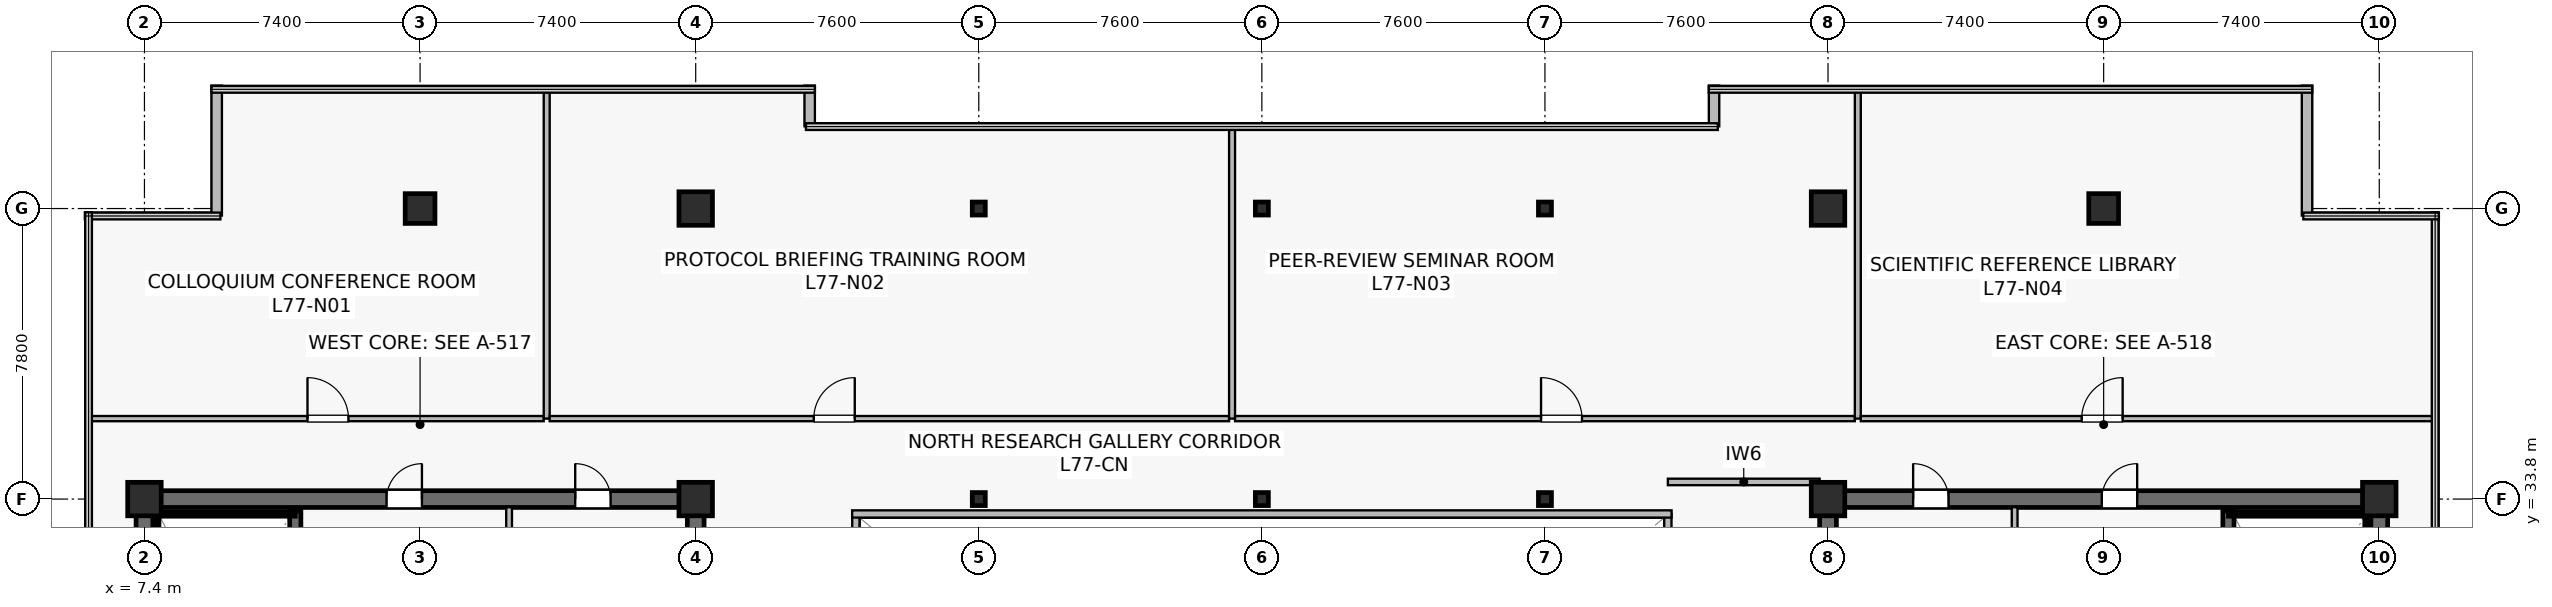
"""IFC4 building model, lengths in metres.
Left out: names, types, materials, properties, quantities, classifications, styles, units other than length and angle.
Written with IfcOpenShell. Run it as: python <this file> out.ifc"""

import sys

from ifc_helpers import new_model, si_unit, direction, frame, frame_2d, origin, origin_2d, place, context, subcontext, project, spatial, rectangle, i_section, extrude, source, transform, mapped, element, fill, save


model = new_model("IFC4")
c1 = context("Model", 3, precision=1e-05, world=origin(), true_north=direction((0.0, 1.0)))
c2 = subcontext(c1, "Body", "Model", "MODEL_VIEW")
j1 = project(units=[si_unit("LENGTHUNIT", "METRE"), si_unit("PLANEANGLEUNIT", "RADIAN")], contexts=[c1])
p1 = place(None, origin())
s1 = spatial("IfcSite", under=j1, at=p1, CompositionType="ELEMENT")
p2 = place(p1, origin())
s2 = spatial("IfcBuilding", under=s1, at=p2, CompositionType="ELEMENT")
p3 = place(p2, frame((0.0, 0.0, 322.8)))
s3 = spatial("IfcBuildingStorey", under=s2, at=p3, CompositionType="ELEMENT", Elevation=322.8)
p4 = place(p3, frame((7.175, 33.8, 0.0), z_axis=(0.0, 0.0, 1.0), x_axis=(1.0, 0.0, 0.0)))
e1 = element("IfcWall", 1, at=p4, inside=s3, PredefinedType="SHEAR", context=c2, shape_type="SweptSolid", body=[
    extrude(rectangle(XDim=15.25, YDim=0.45, at=frame_2d((7.625, 0.0))), origin(), (0.0, 0.0, 1.0), 3.92),
])
p5 = place(p4, frame((6.725, 0.0, 0.0)))
e2 = element("IfcOpeningElement", 2, at=p5, cuts=e1, PredefinedType="OPENING", context=c2, shape_type="SweptSolid", body=[
    extrude(rectangle(XDim=0.95, YDim=2.15, at=frame_2d((0.475, 1.075))), frame((0.0, 0.235, 0.0), z_axis=(0.0, -1.0, 0.0), x_axis=(1.0, 0.0, 0.0)), (0.0, 0.0, 1.0), 0.47),
])
p6 = place(p4, frame((11.79, 0.0, 0.0)))
e3 = element("IfcOpeningElement", 3, at=p6, cuts=e1, PredefinedType="OPENING", context=c2, shape_type="SweptSolid", body=[
    extrude(rectangle(XDim=0.95, YDim=2.15, at=frame_2d((0.475, 1.075))), frame((0.0, 0.235, 0.0), z_axis=(0.0, -1.0, 0.0), x_axis=(1.0, 0.0, 0.0)), (0.0, 0.0, 1.0), 0.47),
])
p7 = place(p3, frame((7.4, 15.025, 0.0), z_axis=(0.0, 0.0, 1.0), x_axis=(0.0, 1.0, 0.0)))
e4 = element("IfcWall", 4, at=p7, inside=s3, PredefinedType="SHEAR", context=c2, shape_type="SweptSolid", body=[
    extrude(rectangle(XDim=18.55, YDim=0.45, at=frame_2d((9.275, 0.0))), origin(), (0.0, 0.0, 1.0), 3.92),
])
p8 = place(p3, frame((22.2, 15.025, 0.0), z_axis=(0.0, 0.0, 1.0), x_axis=(0.0, 1.0, 0.0)))
e5 = element("IfcWall", 5, at=p8, inside=s3, PredefinedType="SHEAR", context=c2, shape_type="SweptSolid", body=[
    extrude(rectangle(XDim=18.55, YDim=0.45, at=frame_2d((9.275, 0.0))), origin(), (0.0, 0.0, 1.0), 3.92),
])
p9 = place(p8, frame((3.525, 0.0, 0.0)))
e6 = element("IfcOpeningElement", 6, at=p9, cuts=e5, PredefinedType="OPENING", context=c2, shape_type="SweptSolid", body=[
    extrude(rectangle(XDim=1.42, YDim=2.2, at=frame_2d((0.71, 1.1))), frame((0.0, 0.235, 0.0), z_axis=(0.0, -1.0, 0.0), x_axis=(1.0, 0.0, 0.0)), (0.0, 0.0, 1.0), 0.47),
])
p10 = place(p3, frame((11.45, 24.85, 0.0), z_axis=(0.0, 0.0, 1.0), x_axis=(0.0, 1.0, 0.0)))
e7 = element("IfcWall", 7, at=p10, inside=s3, PredefinedType="SHEAR", context=c2, shape_type="SweptSolid", body=[
    extrude(rectangle(XDim=8.63, YDim=0.3, at=frame_2d((4.315, 0.0))), origin(), (0.0, 0.0, 1.0), 3.92),
])
p11 = place(p10, frame((0.42, 0.0, 0.0)))
e8 = element("IfcOpeningElement", 8, at=p11, cuts=e7, PredefinedType="OPENING", context=c2, shape_type="SweptSolid", body=[
    extrude(rectangle(XDim=1.1, YDim=2.15, at=frame_2d((0.55, 1.075))), frame((0.0, 0.16, 0.0), z_axis=(0.0, -1.0, 0.0), x_axis=(1.0, 0.0, 0.0)), (0.0, 0.0, 1.0), 0.32),
])
p12 = place(p3, frame((7.73, 33.4, 0.0), z_axis=(0.0, 0.0, 1.0), x_axis=(1.0, 0.0, 0.0)))
e9 = element("IfcWall", 9, at=p12, inside=s3, PredefinedType="SOLIDWALL", context=c2, shape_type="SweptSolid", body=[
    extrude(rectangle(XDim=3.72, YDim=0.12, at=frame_2d((1.86, 0.0))), origin(), (0.0, 0.0, 1.0), 3.92),
])
p13 = place(p3, frame((7.73, 25.0, 0.0), z_axis=(0.0, 0.0, 1.0), x_axis=(0.0, 1.0, 0.0)))
e10 = element("IfcWall", 10, at=p13, inside=s3, PredefinedType="SOLIDWALL", context=c2, shape_type="SweptSolid", body=[
    extrude(rectangle(XDim=8.32, YDim=0.12, at=frame_2d((4.16, 0.0))), origin(), (0.0, 0.0, 1.0), 3.92),
])
p14 = place(p3, frame((52.375, 33.8, 0.0), z_axis=(0.0, 0.0, 1.0), x_axis=(1.0, 0.0, 0.0)))
e11 = element("IfcWall", 11, at=p14, inside=s3, PredefinedType="SHEAR", context=c2, shape_type="SweptSolid", body=[
    extrude(rectangle(XDim=15.25, YDim=0.45, at=frame_2d((7.625, 0.0))), origin(), (0.0, 0.0, 1.0), 3.92),
])
p15 = place(p14, frame((7.575, 0.0, 0.0)))
e12 = element("IfcOpeningElement", 12, at=p15, cuts=e11, PredefinedType="OPENING", context=c2, shape_type="SweptSolid", body=[
    extrude(rectangle(XDim=0.95, YDim=2.15, at=frame_2d((0.475, 1.075))), frame((0.0, 0.235, 0.0), z_axis=(0.0, -1.0, 0.0), x_axis=(1.0, 0.0, 0.0)), (0.0, 0.0, 1.0), 0.47),
])
p16 = place(p14, frame((2.51, 0.0, 0.0)))
e13 = element("IfcOpeningElement", 13, at=p16, cuts=e11, PredefinedType="OPENING", context=c2, shape_type="SweptSolid", body=[
    extrude(rectangle(XDim=0.95, YDim=2.15, at=frame_2d((0.475, 1.075))), frame((0.0, 0.235, 0.0), z_axis=(0.0, -1.0, 0.0), x_axis=(1.0, 0.0, 0.0)), (0.0, 0.0, 1.0), 0.47),
])
p17 = place(p3, frame((52.6, 15.025, 0.0), z_axis=(0.0, 0.0, 1.0), x_axis=(0.0, 1.0, 0.0)))
e14 = element("IfcWall", 14, at=p17, inside=s3, PredefinedType="SHEAR", context=c2, shape_type="SweptSolid", body=[
    extrude(rectangle(XDim=18.55, YDim=0.45, at=frame_2d((9.275, 0.0))), origin(), (0.0, 0.0, 1.0), 3.92),
])
p18 = place(p17, frame((3.525, 0.0, 0.0)))
e15 = element("IfcOpeningElement", 15, at=p18, cuts=e14, PredefinedType="OPENING", context=c2, shape_type="SweptSolid", body=[
    extrude(rectangle(XDim=1.42, YDim=2.2, at=frame_2d((0.71, 1.1))), frame((0.0, 0.235, 0.0), z_axis=(0.0, -1.0, 0.0), x_axis=(1.0, 0.0, 0.0)), (0.0, 0.0, 1.0), 0.47),
])
p19 = place(p3, frame((67.4, 15.025, 0.0), z_axis=(0.0, 0.0, 1.0), x_axis=(0.0, 1.0, 0.0)))
e16 = element("IfcWall", 16, at=p19, inside=s3, PredefinedType="SHEAR", context=c2, shape_type="SweptSolid", body=[
    extrude(rectangle(XDim=18.55, YDim=0.45, at=frame_2d((9.275, 0.0))), origin(), (0.0, 0.0, 1.0), 3.92),
])
p20 = place(p3, frame((63.35, 24.85, 0.0), z_axis=(0.0, 0.0, 1.0), x_axis=(0.0, 1.0, 0.0)))
e17 = element("IfcWall", 17, at=p20, inside=s3, PredefinedType="SHEAR", context=c2, shape_type="SweptSolid", body=[
    extrude(rectangle(XDim=8.63, YDim=0.3, at=frame_2d((4.315, 0.0))), origin(), (0.0, 0.0, 1.0), 3.92),
])
p21 = place(p20, frame((0.42, 0.0, 0.0)))
e18 = element("IfcOpeningElement", 18, at=p21, cuts=e17, PredefinedType="OPENING", context=c2, shape_type="SweptSolid", body=[
    extrude(rectangle(XDim=1.1, YDim=2.15, at=frame_2d((0.55, 1.075))), frame((0.0, 0.16, 0.0), z_axis=(0.0, -1.0, 0.0), x_axis=(1.0, 0.0, 0.0)), (0.0, 0.0, 1.0), 0.32),
])
p22 = place(p3, frame((63.35, 33.4, 0.0), z_axis=(0.0, 0.0, 1.0), x_axis=(1.0, 0.0, 0.0)))
e19 = element("IfcWall", 19, at=p22, inside=s3, PredefinedType="SOLIDWALL", context=c2, shape_type="SweptSolid", body=[
    extrude(rectangle(XDim=3.72, YDim=0.12, at=frame_2d((1.86, 0.0))), origin(), (0.0, 0.0, 1.0), 3.92),
])
p23 = place(p3, frame((67.07, 25.0, 0.0), z_axis=(0.0, 0.0, 1.0), x_axis=(0.0, 1.0, 0.0)))
e20 = element("IfcWall", 20, at=p23, inside=s3, PredefinedType="SOLIDWALL", context=c2, shape_type="SweptSolid", body=[
    extrude(rectangle(XDim=8.32, YDim=0.12, at=frame_2d((4.16, 0.0))), origin(), (0.0, 0.0, 1.0), 3.92),
])
m1 = source(origin(), c2, "Body", "SweptSolid", [
    extrude(rectangle(XDim=0.9, YDim=0.9, at=origin_2d()), origin(), (0.0, 0.0, 1.0), 4.2),
])
for number, where, z_axis, x_axis in (
    (21, (7.4, 33.8, 0.0), (0.0, 0.0, 1.0), (1.0, 0.0, 0.0)),
    (22, (22.2, 33.8, 0.0), (0.0, 0.0, 1.0), (1.0, 0.0, 0.0)),
):
    element("IfcColumn", number, at=place(p3, frame(where, z_axis=z_axis, x_axis=x_axis)), inside=s3, PredefinedType="COLUMN", context=c2, shape_type="MappedRepresentation", body=[
        mapped(m1, transform((0.0, 0.0, 0.0), scale=1.0)),
    ])
m2 = source(origin(), c2, "Body", "SweptSolid", [
    extrude(rectangle(XDim=0.8, YDim=0.8, at=origin_2d()), origin(), (0.0, 0.0, 1.0), 4.2),
])
p24 = place(p3, frame((14.8, 41.6, 0.0), z_axis=(0.0, 0.0, 1.0), x_axis=(1.0, 0.0, 0.0)))
e23 = element("IfcColumn", 23, at=p24, inside=s3, PredefinedType="COLUMN", context=c2, shape_type="MappedRepresentation", body=[
    mapped(m2, transform((0.0, 0.0, 0.0), scale=1.0)),
])
for number, where, z_axis, x_axis in (
    (24, (22.2, 41.6, 0.0), (0.0, 0.0, 1.0), (1.0, 0.0, 0.0)),
    (25, (52.6, 33.8, 0.0), (0.0, 0.0, 1.0), (1.0, 0.0, 0.0)),
    (26, (67.4, 33.8, 0.0), (0.0, 0.0, 1.0), (1.0, 0.0, 0.0)),
    (27, (52.6, 41.6, 0.0), (0.0, 0.0, 1.0), (1.0, 0.0, 0.0)),
):
    element("IfcColumn", number, at=place(p3, frame(where, z_axis=z_axis, x_axis=x_axis)), inside=s3, PredefinedType="COLUMN", context=c2, shape_type="MappedRepresentation", body=[
        mapped(m1, transform((0.0, 0.0, 0.0), scale=1.0)),
    ])
p25 = place(p3, frame((60.0, 41.6, 0.0), z_axis=(0.0, 0.0, 1.0), x_axis=(1.0, 0.0, 0.0)))
e28 = element("IfcColumn", 28, at=p25, inside=s3, PredefinedType="COLUMN", context=c2, shape_type="MappedRepresentation", body=[
    mapped(m2, transform((0.0, 0.0, 0.0), scale=1.0)),
])
m3 = source(origin(), c2, "Body", "SweptSolid", [
    extrude(i_section(OverallWidth=0.35, OverallDepth=0.35, WebThickness=0.012, FlangeThickness=0.019, at=origin_2d()), origin(), (0.0, 0.0, 1.0), 4.2),
])
for number, where, z_axis, x_axis in (
    (29, (29.8, 33.8, 0.0), (0.0, 0.0, 1.0), (1.0, 0.0, 0.0)),
    (30, (29.8, 41.6, 0.0), (0.0, 0.0, 1.0), (1.0, 0.0, 0.0)),
    (31, (37.4, 33.8, 0.0), (0.0, 0.0, 1.0), (1.0, 0.0, 0.0)),
    (32, (37.4, 41.6, 0.0), (0.0, 0.0, 1.0), (1.0, 0.0, 0.0)),
    (33, (45.0, 33.8, 0.0), (0.0, 0.0, 1.0), (1.0, 0.0, 0.0)),
    (34, (45.0, 41.6, 0.0), (0.0, 0.0, 1.0), (1.0, 0.0, 0.0)),
):
    element("IfcColumn", number, at=place(p3, frame(where, z_axis=z_axis, x_axis=x_axis)), inside=s3, PredefinedType="COLUMN", context=c2, shape_type="MappedRepresentation", body=[
        mapped(m3, transform((0.0, 0.0, 0.0), scale=1.0)),
    ])
p26 = place(p3, frame((65.46, 41.412, 0.0), z_axis=(0.0, 0.0, 1.0), x_axis=(0.0, 1.0, 0.0)))
e35 = element("IfcWall", 35, at=p26, inside=s3, PredefinedType="STANDARD", context=c2, shape_type="SweptSolid", body=[
    extrude(rectangle(XDim=3.488, YDim=0.28, at=frame_2d((1.744, 0.0))), origin(), (0.0, 0.0, 1.0), 3.92),
])
for number, where, z_axis, x_axis in (
    (36, (49.54, 44.9, 0.0), (0.0, 0.0, 1.0), (0.0, -1.0, 0.0)),
    (37, (25.26, 43.807, 0.0), (0.0, 0.0, 1.0), (0.0, 1.0, 0.0)),
):
    element("IfcWall", number, at=place(p3, frame(where, z_axis=z_axis, x_axis=x_axis)), inside=s3, PredefinedType="STANDARD", context=c2, shape_type="SweptSolid", body=[
        extrude(rectangle(XDim=1.093, YDim=0.28, at=frame_2d((0.546, 0.0))), origin(), (0.0, 0.0, 1.0), 3.92),
    ])
p27 = place(p3, frame((9.34, 44.9, 0.0), z_axis=(0.0, 0.0, 1.0), x_axis=(0.0, -1.0, 0.0)))
e38 = element("IfcWall", 38, at=p27, inside=s3, PredefinedType="STANDARD", context=c2, shape_type="SweptSolid", body=[
    extrude(rectangle(XDim=3.488, YDim=0.28, at=frame_2d((1.744, 0.0))), origin(), (0.0, 0.0, 1.0), 3.92),
])
for number, where, z_axis, x_axis in (
    (39, (17.19, 29.65, 0.0), (0.0, 0.0, 1.0), (0.0, 1.0, 0.0)),
    (40, (57.61, 29.65, 0.0), (0.0, 0.0, 1.0), (0.0, 1.0, 0.0)),
):
    element("IfcWall", number, at=place(p3, frame(where, z_axis=z_axis, x_axis=x_axis)), inside=s3, PredefinedType="PLUMBINGWALL", context=c2, shape_type="SweptSolid", body=[
        extrude(rectangle(XDim=3.93, YDim=0.155, at=frame_2d((1.965, 0.0))), origin(), (0.0, 0.0, 1.0), 3.92),
    ])
p28 = place(p3, frame((48.3, 34.26, 0.0), z_axis=(0.0, 0.0, 1.0), x_axis=(1.0, 0.0, 0.0)))
e41 = element("IfcWall", 41, at=p28, inside=s3, PredefinedType="PARTITIONING", context=c2, shape_type="SweptSolid", body=[
    extrude(rectangle(XDim=4.075, YDim=0.175, at=frame_2d((2.038, 0.0))), origin(), (0.0, 0.0, 1.0), 3.655),
])
p29 = place(p3, frame((26.5, 15.2, 0.0), z_axis=(0.0, 0.0, 1.0), x_axis=(0.0, 1.0, 0.0)))
e42 = element("IfcWall", 42, at=p29, inside=s3, PredefinedType="SOLIDWALL", context=c2, shape_type="SweptSolid", body=[
    extrude(rectangle(XDim=18.2, YDim=0.195, at=frame_2d((9.1, 0.0))), origin(), (0.0, 0.0, 1.0), 3.92),
])
p30 = place(p29, frame((1.8, 0.0, 0.9)))
e43 = element("IfcOpeningElement", 43, at=p30, cuts=e42, PredefinedType="OPENING", context=c2, shape_type="SweptSolid", body=[
    extrude(rectangle(XDim=1.2, YDim=1.35, at=frame_2d((0.6, 0.675))), frame((0.0, 0.107, 0.0), z_axis=(0.0, -1.0, 0.0), x_axis=(1.0, 0.0, 0.0)), (0.0, 0.0, 1.0), 0.215),
])
p31 = place(p29, frame((13.2, 0.0, 0.9)))
e44 = element("IfcOpeningElement", 44, at=p31, cuts=e42, PredefinedType="OPENING", context=c2, shape_type="SweptSolid", body=[
    extrude(rectangle(XDim=1.2, YDim=1.35, at=frame_2d((0.6, 0.675))), frame((0.0, 0.107, 0.0), z_axis=(0.0, -1.0, 0.0), x_axis=(1.0, 0.0, 0.0)), (0.0, 0.0, 1.0), 0.215),
])
p32 = place(p3, frame((48.3, 15.2, 0.0), z_axis=(0.0, 0.0, 1.0), x_axis=(0.0, 1.0, 0.0)))
e45 = element("IfcWall", 45, at=p32, inside=s3, PredefinedType="SOLIDWALL", context=c2, shape_type="SweptSolid", body=[
    extrude(rectangle(XDim=18.2, YDim=0.195, at=frame_2d((9.1, 0.0))), origin(), (0.0, 0.0, 1.0), 3.92),
])
p33 = place(p32, frame((1.8, 0.0, 0.9)))
e46 = element("IfcOpeningElement", 46, at=p33, cuts=e45, PredefinedType="OPENING", context=c2, shape_type="SweptSolid", body=[
    extrude(rectangle(XDim=1.2, YDim=1.35, at=frame_2d((0.6, 0.675))), frame((0.0, 0.107, 0.0), z_axis=(0.0, -1.0, 0.0), x_axis=(1.0, 0.0, 0.0)), (0.0, 0.0, 1.0), 0.215),
])
p34 = place(p32, frame((13.2, 0.0, 0.9)))
e47 = element("IfcOpeningElement", 47, at=p34, cuts=e45, PredefinedType="OPENING", context=c2, shape_type="SweptSolid", body=[
    extrude(rectangle(XDim=1.2, YDim=1.35, at=frame_2d((0.6, 0.675))), frame((0.0, 0.107, 0.0), z_axis=(0.0, -1.0, 0.0), x_axis=(1.0, 0.0, 0.0)), (0.0, 0.0, 1.0), 0.215),
])
p35 = place(p3, frame((26.4, 33.4, 0.0), z_axis=(0.0, 0.0, 1.0), x_axis=(1.0, 0.0, 0.0)))
e48 = element("IfcWall", 48, at=p35, inside=s3, PredefinedType="SOLIDWALL", context=c2, shape_type="SweptSolid", body=[
    extrude(rectangle(XDim=22.0, YDim=0.195, at=frame_2d((11.0, 0.0))), origin(), (0.0, 0.0, 1.0), 3.92),
])
p36 = place(p3, frame((5.91, 35.96, 0.0), z_axis=(0.0, 0.0, 1.0), x_axis=(1.0, 0.0, 0.0)))
e49 = element("IfcWall", 49, at=p36, inside=s3, PredefinedType="PARTITIONING", context=c2, shape_type="SweptSolid", body=[
    extrude(rectangle(XDim=12.21, YDim=0.14, at=frame_2d((6.105, 0.0))), origin(), (0.0, 0.0, 1.0), 3.317),
])
p37 = place(p36, frame((5.867, 0.0, 0.0)))
e50 = element("IfcOpeningElement", 50, at=p37, cuts=e49, PredefinedType="OPENING", context=c2, shape_type="SweptSolid", body=[
    extrude(rectangle(XDim=1.1, YDim=2.18, at=frame_2d((0.55, 1.09))), frame((0.0, 0.08, 0.0), z_axis=(0.0, -1.0, 0.0), x_axis=(1.0, 0.0, 0.0)), (0.0, 0.0, 1.0), 0.16),
])
p38 = place(p3, frame((18.2, 35.96, 0.0), z_axis=(0.0, 0.0, 1.0), x_axis=(0.0, 1.0, 0.0)))
e51 = element("IfcWall", 51, at=p38, inside=s3, PredefinedType="PARTITIONING", context=c2, shape_type="SweptSolid", body=[
    extrude(rectangle(XDim=8.83, YDim=0.16, at=frame_2d((4.415, 0.0))), origin(), (0.0, 0.0, 1.0), 3.255),
])
p39 = place(p3, frame((18.28, 35.96, 0.0), z_axis=(0.0, 0.0, 1.0), x_axis=(1.0, 0.0, 0.0)))
e52 = element("IfcWall", 52, at=p39, inside=s3, PredefinedType="PARTITIONING", context=c2, shape_type="SweptSolid", body=[
    extrude(rectangle(XDim=18.24, YDim=0.14, at=frame_2d((9.12, 0.0))), origin(), (0.0, 0.0, 1.0), 3.317),
])
p40 = place(p39, frame((7.09, 0.0, 0.0)))
e53 = element("IfcOpeningElement", 53, at=p40, cuts=e52, PredefinedType="OPENING", context=c2, shape_type="SweptSolid", body=[
    extrude(rectangle(XDim=1.1, YDim=2.18, at=frame_2d((0.55, 1.09))), frame((0.0, 0.08, 0.0), z_axis=(0.0, -1.0, 0.0), x_axis=(1.0, 0.0, 0.0)), (0.0, 0.0, 1.0), 0.16),
])
p41 = place(p3, frame((36.6, 35.96, 0.0), z_axis=(0.0, 0.0, 1.0), x_axis=(0.0, 1.0, 0.0)))
e54 = element("IfcWall", 54, at=p41, inside=s3, PredefinedType="PARTITIONING", context=c2, shape_type="SweptSolid", body=[
    extrude(rectangle(XDim=7.83, YDim=0.16, at=frame_2d((3.915, 0.0))), origin(), (0.0, 0.0, 1.0), 3.255),
])
p42 = place(p3, frame((36.68, 35.96, 0.0), z_axis=(0.0, 0.0, 1.0), x_axis=(1.0, 0.0, 0.0)))
e55 = element("IfcWall", 55, at=p42, inside=s3, PredefinedType="PARTITIONING", context=c2, shape_type="SweptSolid", body=[
    extrude(rectangle(XDim=16.64, YDim=0.14, at=frame_2d((8.32, 0.0))), origin(), (0.0, 0.0, 1.0), 3.317),
])
p43 = place(p42, frame((8.215, 0.0, 0.0)))
e56 = element("IfcOpeningElement", 56, at=p43, cuts=e55, PredefinedType="OPENING", context=c2, shape_type="SweptSolid", body=[
    extrude(rectangle(XDim=1.1, YDim=2.18, at=frame_2d((0.55, 1.09))), frame((0.0, 0.08, 0.0), z_axis=(0.0, -1.0, 0.0), x_axis=(1.0, 0.0, 0.0)), (0.0, 0.0, 1.0), 0.16),
])
p44 = place(p3, frame((53.4, 35.96, 0.0), z_axis=(0.0, 0.0, 1.0), x_axis=(0.0, 1.0, 0.0)))
e57 = element("IfcWall", 57, at=p44, inside=s3, PredefinedType="PARTITIONING", context=c2, shape_type="SweptSolid", body=[
    extrude(rectangle(XDim=8.83, YDim=0.16, at=frame_2d((4.415, 0.0))), origin(), (0.0, 0.0, 1.0), 3.255),
])
p45 = place(p3, frame((53.48, 35.96, 0.0), z_axis=(0.0, 0.0, 1.0), x_axis=(1.0, 0.0, 0.0)))
e58 = element("IfcWall", 58, at=p45, inside=s3, PredefinedType="PARTITIONING", context=c2, shape_type="SweptSolid", body=[
    extrude(rectangle(XDim=15.41, YDim=0.14, at=frame_2d((7.705, 0.0))), origin(), (0.0, 0.0, 1.0), 3.317),
])
p46 = place(p45, frame((5.93, 0.0, 0.0)))
e59 = element("IfcOpeningElement", 59, at=p46, cuts=e58, PredefinedType="OPENING", context=c2, shape_type="SweptSolid", body=[
    extrude(rectangle(XDim=1.1, YDim=2.18, at=frame_2d((0.55, 1.09))), frame((0.0, 0.08, 0.0), z_axis=(0.0, -1.0, 0.0), x_axis=(1.0, 0.0, 0.0)), (0.0, 0.0, 1.0), 0.16),
])
m4 = source(origin(), c2, "Body", "SweptSolid", [
    extrude(rectangle(XDim=0.95, YDim=2.15, at=frame_2d((0.475, 1.075))), frame((0.0, 0.025, 0.0), z_axis=(0.0, -1.0, 0.0), x_axis=(1.0, 0.0, 0.0)), (0.0, 0.0, 1.0), 0.05),
])
p47 = place(p5, origin())
e60 = element("IfcDoor", 60, at=p47, inside=s3, OperationType="SINGLE_SWING_RIGHT", PredefinedType="DOOR", context=c2, shape_type="MappedRepresentation", body=[
    mapped(m4, transform((0.0, 0.0, 0.0), scale=1.0)),
])
fill(e2, e60)
p48 = place(p6, origin())
e61 = element("IfcDoor", 61, at=p48, inside=s3, OperationType="SINGLE_SWING_LEFT", PredefinedType="DOOR", context=c2, shape_type="MappedRepresentation", body=[
    mapped(m4, transform((0.0, 0.0, 0.0), scale=1.0)),
])
fill(e3, e61)
p49 = place(p15, origin())
e62 = element("IfcDoor", 62, at=p49, inside=s3, OperationType="SINGLE_SWING_RIGHT", PredefinedType="DOOR", context=c2, shape_type="MappedRepresentation", body=[
    mapped(m4, transform((0.0, 0.0, 0.0), scale=1.0)),
])
fill(e12, e62)
p50 = place(p16, origin())
e63 = element("IfcDoor", 63, at=p50, inside=s3, OperationType="SINGLE_SWING_LEFT", PredefinedType="DOOR", context=c2, shape_type="MappedRepresentation", body=[
    mapped(m4, transform((0.0, 0.0, 0.0), scale=1.0)),
])
fill(e13, e63)
m5 = source(origin(), c2, "Body", "SweptSolid", [
    extrude(rectangle(XDim=1.1, YDim=2.18, at=frame_2d((0.55, 1.09))), frame((0.0, 0.025, 0.0), z_axis=(0.0, -1.0, 0.0), x_axis=(1.0, 0.0, 0.0)), (0.0, 0.0, 1.0), 0.05),
])
p51 = place(p37, origin())
e64 = element("IfcDoor", 64, at=p51, inside=s3, OperationType="SINGLE_SWING_LEFT", PredefinedType="DOOR", context=c2, shape_type="MappedRepresentation", body=[
    mapped(m5, transform((0.0, 0.0, 0.0), scale=1.0)),
])
fill(e50, e64)
p52 = place(p40, origin())
e65 = element("IfcDoor", 65, at=p52, inside=s3, OperationType="SINGLE_SWING_RIGHT", PredefinedType="DOOR", context=c2, shape_type="MappedRepresentation", body=[
    mapped(m5, transform((0.0, 0.0, 0.0), scale=1.0)),
])
fill(e53, e65)
p53 = place(p43, origin())
e66 = element("IfcDoor", 66, at=p53, inside=s3, OperationType="SINGLE_SWING_LEFT", PredefinedType="DOOR", context=c2, shape_type="MappedRepresentation", body=[
    mapped(m5, transform((0.0, 0.0, 0.0), scale=1.0)),
])
fill(e56, e66)
p54 = place(p46, origin())
e67 = element("IfcDoor", 67, at=p54, inside=s3, OperationType="SINGLE_SWING_RIGHT", PredefinedType="DOOR", context=c2, shape_type="MappedRepresentation", body=[
    mapped(m5, transform((0.0, 0.0, 0.0), scale=1.0)),
])
fill(e59, e67)
save(model, sys.argv[1])
